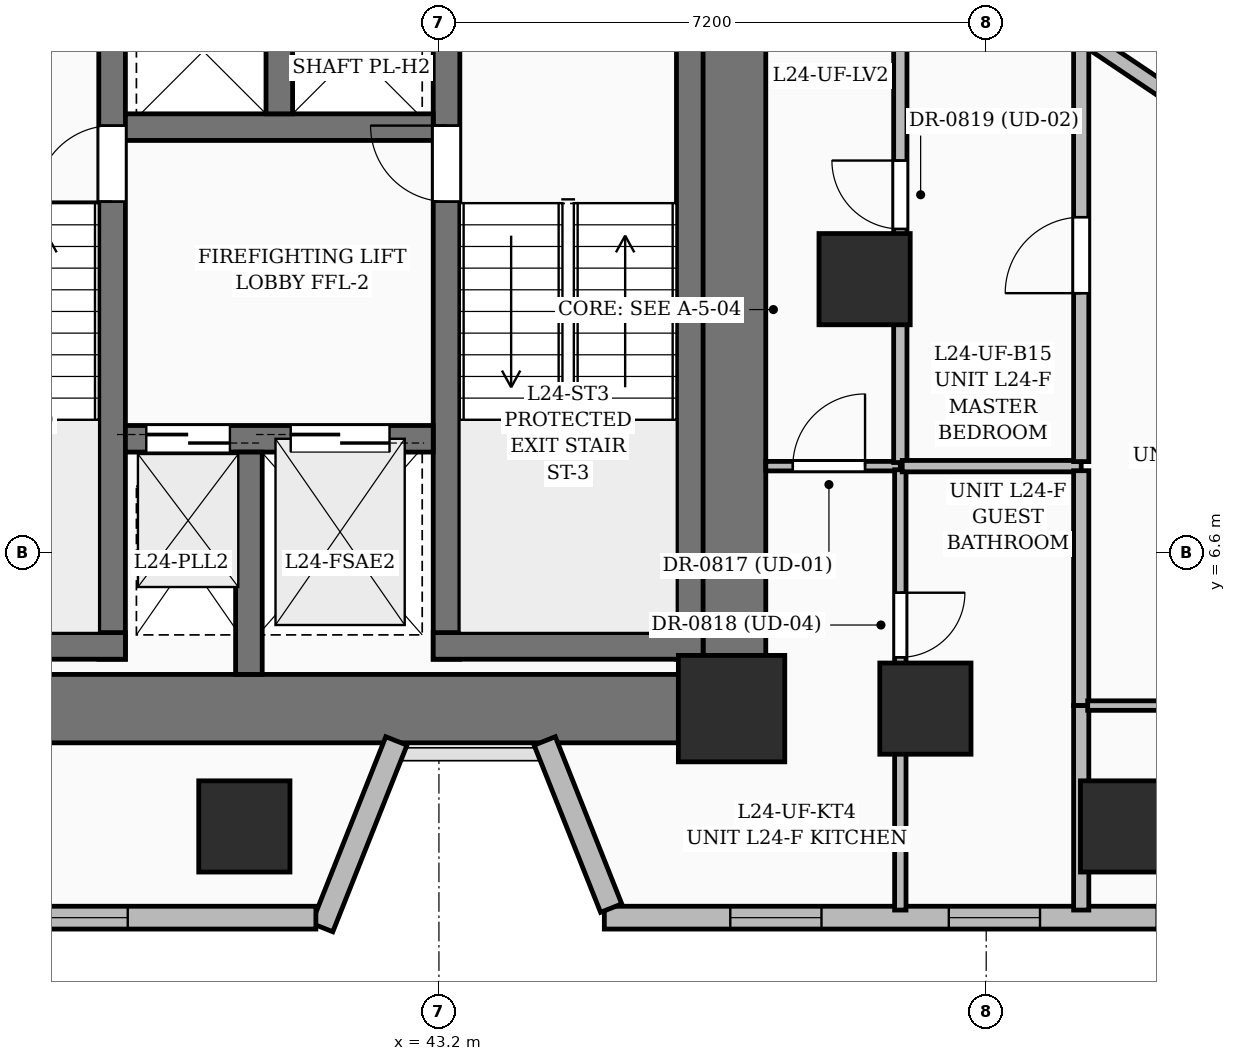
"""IFC4 building model, lengths in metres.
Left out: names, types, materials, properties, quantities, classifications, styles, units other than length and angle.
Written with IfcOpenShell. Run it as: python <this file> out.ifc"""

import sys

from ifc_helpers import new_model, si_unit, direction, frame, frame_2d, origin, origin_2d, place, context, subcontext, project, spatial, rectangle, extrude, element, fill, save


model = new_model("IFC4")
c1 = context("Model", 3, precision=1e-05, world=origin(), true_north=direction((0.0, 1.0)))
c2 = subcontext(c1, "Body", "Model", "MODEL_VIEW")
j1 = project(units=[si_unit("LENGTHUNIT", "METRE"), si_unit("PLANEANGLEUNIT", "RADIAN")], contexts=[c1])
p1 = place(None, origin())
s1 = spatial("IfcSite", under=j1, at=p1, CompositionType="ELEMENT")
p2 = place(p1, origin())
s2 = spatial("IfcBuilding", under=s1, at=p2, CompositionType="ELEMENT")
p3 = place(p2, frame((0.0, 0.0, 96.6)))
s3 = spatial("IfcBuildingStorey", under=s2, at=p3, CompositionType="ELEMENT", Elevation=96.6)
p4 = place(p3, frame((47.05, 4.55, 0.0), z_axis=(0.0, 0.0, 1.0), x_axis=(1.0, 0.0, 0.0)))
e1 = element("IfcColumn", 1, at=p4, inside=s3, PredefinedType="COLUMN", context=c2, shape_type="SweptSolid", body=[
    extrude(rectangle(XDim=1.4, YDim=1.4, at=origin_2d()), origin(), (0.0, 0.0, 1.0), 3.6),
])
for number, where, z_axis, x_axis in (
    (2, (49.6, 4.55, 0.0), (0.0, 0.0, 1.0), (1.0, 0.0, 0.0)),
    (3, (48.8, 10.2, 0.0), (0.0, 0.0, 1.0), (1.0, 0.0, 0.0)),
):
    element("IfcColumn", number, at=place(p3, frame(where, z_axis=z_axis, x_axis=x_axis)), inside=s3, PredefinedType="COLUMN", context=c2, shape_type="SweptSolid", body=[
        extrude(rectangle(XDim=1.2, YDim=1.2, at=origin_2d()), origin(), (0.0, 0.0, 1.0), 3.6),
    ])
p5 = place(p3, frame((35.85, 4.55, 0.0), z_axis=(0.0, 0.0, 1.0), x_axis=(1.0, 0.0, 0.0)))
e4 = element("IfcWall", 4, at=p5, inside=s3, PredefinedType="SHEAR", context=c2, shape_type="SweptSolid", body=[
    extrude(rectangle(XDim=10.5, YDim=0.9, at=frame_2d((5.25, 0.0))), origin(), (0.0, 0.0, 1.0), 3.6),
])
p6 = place(p3, frame((47.05, 5.25, 0.0), z_axis=(0.0, 0.0, 1.0), x_axis=(0.0, 1.0, 0.0)))
e5 = element("IfcWall", 5, at=p6, inside=s3, PredefinedType="SHEAR", context=c2, shape_type="SweptSolid", body=[
    extrude(rectangle(XDim=8.8, YDim=0.9, at=frame_2d((4.4, 0.0))), origin(), (0.0, 0.0, 1.0), 3.6),
])
p7 = place(p3, frame((38.9, 5.2, 0.0), z_axis=(0.0, 0.0, 1.0), x_axis=(0.0, 1.0, 0.0)))
e6 = element("IfcWall", 6, at=p7, inside=s3, PredefinedType="SOLIDWALL", context=c2, shape_type="SweptSolid", body=[
    extrude(rectangle(XDim=9.1, YDim=0.35, at=frame_2d((4.55, 0.0))), origin(), (0.0, 0.0, 1.0), 3.6),
])
p8 = place(p7, frame((6.02, 0.0, 0.0)))
e7 = element("IfcOpeningElement", 7, at=p8, cuts=e6, PredefinedType="OPENING", context=c2, shape_type="SweptSolid", body=[
    extrude(rectangle(XDim=1.0, YDim=2.15, at=frame_2d((0.5, 1.075))), frame((0.0, 0.185, 0.0), z_axis=(0.0, -1.0, 0.0), x_axis=(1.0, 0.0, 0.0)), (0.0, 0.0, 1.0), 0.37),
])
p9 = place(p3, frame((35.525, 5.375, 0.0), z_axis=(0.0, 0.0, 1.0), x_axis=(1.0, 0.0, 0.0)))
e8 = element("IfcWall", 8, at=p9, inside=s3, PredefinedType="SOLIDWALL", context=c2, shape_type="SweptSolid", body=[
    extrude(rectangle(XDim=3.55, YDim=0.35, at=frame_2d((1.775, 0.0))), origin(), (0.0, 0.0, 1.0), 3.6),
])
p10 = place(p3, frame((43.3, 5.2, 0.0), z_axis=(0.0, 0.0, 1.0), x_axis=(0.0, 1.0, 0.0)))
e9 = element("IfcWall", 9, at=p10, inside=s3, PredefinedType="SOLIDWALL", context=c2, shape_type="SweptSolid", body=[
    extrude(rectangle(XDim=9.1, YDim=0.35, at=frame_2d((4.55, 0.0))), origin(), (0.0, 0.0, 1.0), 3.6),
])
p11 = place(p10, frame((6.02, 0.0, 0.0)))
e10 = element("IfcOpeningElement", 10, at=p11, cuts=e9, PredefinedType="OPENING", context=c2, shape_type="SweptSolid", body=[
    extrude(rectangle(XDim=1.0, YDim=2.15, at=frame_2d((0.5, 1.075))), frame((0.0, 0.185, 0.0), z_axis=(0.0, -1.0, 0.0), x_axis=(1.0, 0.0, 0.0)), (0.0, 0.0, 1.0), 0.37),
])
p12 = place(p3, frame((46.5, 5.2, 0.0), z_axis=(0.0, 0.0, 1.0), x_axis=(0.0, 1.0, 0.0)))
e11 = element("IfcWall", 11, at=p12, inside=s3, PredefinedType="SOLIDWALL", context=c2, shape_type="SweptSolid", body=[
    extrude(rectangle(XDim=9.1, YDim=0.35, at=frame_2d((4.55, 0.0))), origin(), (0.0, 0.0, 1.0), 3.6),
])
p13 = place(p3, frame((43.125, 5.375, 0.0), z_axis=(0.0, 0.0, 1.0), x_axis=(1.0, 0.0, 0.0)))
e12 = element("IfcWall", 12, at=p13, inside=s3, PredefinedType="SOLIDWALL", context=c2, shape_type="SweptSolid", body=[
    extrude(rectangle(XDim=3.55, YDim=0.35, at=frame_2d((1.775, 0.0))), origin(), (0.0, 0.0, 1.0), 3.6),
])
p14 = place(p3, frame((39.075, 8.1, 0.0), z_axis=(0.0, 0.0, 1.0), x_axis=(1.0, 0.0, 0.0)))
e13 = element("IfcWall", 13, at=p14, inside=s3, PredefinedType="SOLIDWALL", context=c2, shape_type="SweptSolid", body=[
    extrude(rectangle(XDim=4.05, YDim=0.35, at=frame_2d((2.025, 0.0))), origin(), (0.0, 0.0, 1.0), 3.6),
])
p15 = place(p14, frame((2.175, 0.0, 0.0)))
e14 = element("IfcOpeningElement", 14, at=p15, cuts=e13, PredefinedType="OPENING", context=c2, shape_type="SweptSolid", body=[
    extrude(rectangle(XDim=1.3, YDim=2.25, at=frame_2d((0.65, 1.125))), frame((0.0, 0.185, 0.0), z_axis=(0.0, -1.0, 0.0), x_axis=(1.0, 0.0, 0.0)), (0.0, 0.0, 1.0), 0.37),
])
p16 = place(p14, frame((0.275, 0.0, 0.0)))
e15 = element("IfcOpeningElement", 15, at=p16, cuts=e13, PredefinedType="OPENING", context=c2, shape_type="SweptSolid", body=[
    extrude(rectangle(XDim=1.1, YDim=2.2, at=frame_2d((0.55, 1.1))), frame((0.0, 0.185, 0.0), z_axis=(0.0, -1.0, 0.0), x_axis=(1.0, 0.0, 0.0)), (0.0, 0.0, 1.0), 0.37),
])
p17 = place(p3, frame((40.7, 5.0, 0.0), z_axis=(0.0, 0.0, 1.0), x_axis=(0.0, 1.0, 0.0)))
e16 = element("IfcWall", 16, at=p17, inside=s3, PredefinedType="SOLIDWALL", context=c2, shape_type="SweptSolid", body=[
    extrude(rectangle(XDim=2.925, YDim=0.35, at=frame_2d((1.462, 0.0))), origin(), (0.0, 0.0, 1.0), 3.6),
])
p18 = place(p3, frame((39.075, 12.2, 0.0), z_axis=(0.0, 0.0, 1.0), x_axis=(1.0, 0.0, 0.0)))
e17 = element("IfcWall", 17, at=p18, inside=s3, PredefinedType="SOLIDWALL", context=c2, shape_type="SweptSolid", body=[
    extrude(rectangle(XDim=4.05, YDim=0.35, at=frame_2d((2.025, 0.0))), origin(), (0.0, 0.0, 1.0), 3.6),
])
p19 = place(p3, frame((41.1, 12.375, 0.0), z_axis=(0.0, 0.0, 1.0), x_axis=(0.0, 1.0, 0.0)))
e18 = element("IfcWall", 18, at=p19, inside=s3, PredefinedType="SOLIDWALL", context=c2, shape_type="SweptSolid", body=[
    extrude(rectangle(XDim=1.925, YDim=0.35, at=frame_2d((0.962, 0.0))), origin(), (0.0, 0.0, 1.0), 3.6),
])
for number, where, z_axis, x_axis in (
    (19, (40.64, 3.0, 0.0), (0.0, 0.0, 1.0), (1.0, 0.0, 0.0)),
    (20, (52.24, 3.0, 0.0), (0.0, 0.0, 1.0), (1.0, 0.0, 0.0)),
):
    element("IfcColumn", number, at=place(p3, frame(where, z_axis=z_axis, x_axis=x_axis)), inside=s3, PredefinedType="COLUMN", context=c2, shape_type="SweptSolid", body=[
        extrude(rectangle(XDim=1.2, YDim=1.2, at=origin_2d()), origin(), (0.0, 0.0, 1.0), 3.6),
    ])
p20 = place(p3, frame((52.658, 1.8, 0.0), z_axis=(0.0, 0.0, 1.0), x_axis=(-1.0, 0.0, 0.0)))
e21 = element("IfcWall", 21, at=p20, inside=s3, PredefinedType="SOLIDWALL", context=c2, shape_type="SweptSolid", body=[
    extrude(rectangle(XDim=7.282, YDim=0.3, at=frame_2d((3.641, 0.0))), origin(), (0.0, 0.0, 1.0), 3.3),
])
p21 = place(p20, frame((1.55, 0.0, 0.8)))
e22 = element("IfcOpeningElement", 22, at=p21, cuts=e21, PredefinedType="OPENING", context=c2, shape_type="SweptSolid", body=[
    extrude(rectangle(XDim=1.2, YDim=1.8, at=frame_2d((0.6, 0.9))), frame((0.0, 0.16, 0.0), z_axis=(0.0, -1.0, 0.0), x_axis=(1.0, 0.0, 0.0)), (0.0, 0.0, 1.0), 0.32),
])
p22 = place(p20, frame((4.425, 0.0, 0.8)))
e23 = element("IfcOpeningElement", 23, at=p22, cuts=e21, PredefinedType="OPENING", context=c2, shape_type="SweptSolid", body=[
    extrude(rectangle(XDim=1.2, YDim=1.8, at=frame_2d((0.6, 0.9))), frame((0.0, 0.16, 0.0), z_axis=(0.0, -1.0, 0.0), x_axis=(1.0, 0.0, 0.0)), (0.0, 0.0, 1.0), 0.32),
])
p23 = place(p3, frame((45.466, 1.925, 0.0), z_axis=(0.0, 0.0, 1.0), x_axis=(-0.36946923074, 0.92924296475, 0.0)))
e24 = element("IfcWall", 24, at=p23, inside=s3, PredefinedType="SOLIDWALL", context=c2, shape_type="SweptSolid", body=[
    extrude(rectangle(XDim=2.367, YDim=0.3, at=frame_2d((1.184, 0.0))), origin(), (0.0, 0.0, 1.0), 2.325),
])
p24 = place(p3, frame((42.64, 4.125, 0.0), z_axis=(0.0, 0.0, 1.0), x_axis=(-0.369477840539, -0.929239541426, 0.0)))
e25 = element("IfcWall", 25, at=p24, inside=s3, PredefinedType="SOLIDWALL", context=c2, shape_type="SweptSolid", body=[
    extrude(rectangle(XDim=2.642, YDim=0.3, at=frame_2d((1.321, 0.0))), origin(), (0.0, 0.0, 1.0), 2.325),
])
p25 = place(p3, frame((41.581, 1.8, 0.0), z_axis=(0.0, 0.0, 1.0), x_axis=(-1.0, 0.0, 0.0)))
e26 = element("IfcWall", 26, at=p25, inside=s3, PredefinedType="SOLIDWALL", context=c2, shape_type="SweptSolid", body=[
    extrude(rectangle(XDim=7.174, YDim=0.3, at=frame_2d((3.587, 0.0))), origin(), (0.0, 0.0, 1.0), 3.3),
])
p26 = place(p25, frame((2.475, 0.0, 0.6)))
e27 = element("IfcOpeningElement", 27, at=p26, cuts=e26, PredefinedType="OPENING", context=c2, shape_type="SweptSolid", body=[
    extrude(rectangle(XDim=1.8, YDim=2.1, at=frame_2d((0.9, 1.05))), frame((0.0, 0.16, 0.0), z_axis=(0.0, -1.0, 0.0), x_axis=(1.0, 0.0, 0.0)), (0.0, 0.0, 1.0), 0.32),
])
p27 = place(p3, frame((47.5, 7.74, 0.0), z_axis=(0.0, 0.0, 1.0), x_axis=(1.0, 0.0, 0.0)))
e28 = element("IfcWall", 28, at=p27, inside=s3, PredefinedType="PARTITIONING", context=c2, shape_type="SweptSolid", body=[
    extrude(rectangle(XDim=1.77, YDim=0.125, at=frame_2d((0.885, 0.0))), origin(), (0.0, 0.0, 1.0), 2.259),
])
p28 = place(p27, frame((0.356, 0.0, 0.0)))
e29 = element("IfcOpeningElement", 29, at=p28, cuts=e28, PredefinedType="OPENING", context=c2, shape_type="SweptSolid", body=[
    extrude(rectangle(XDim=0.95, YDim=2.2, at=frame_2d((0.475, 1.1))), frame((0.0, 0.072, 0.0), z_axis=(0.0, -1.0, 0.0), x_axis=(1.0, 0.0, 0.0)), (0.0, 0.0, 1.0), 0.145),
])
p29 = place(p3, frame((49.27, 7.788, 0.0), z_axis=(0.0, 0.0, 1.0), x_axis=(0.0, 1.0, 0.0)))
e30 = element("IfcWall", 30, at=p29, inside=s3, PredefinedType="PARTITIONING", context=c2, shape_type="SweptSolid", body=[
    extrude(rectangle(XDim=7.102, YDim=0.175, at=frame_2d((3.551, 0.0))), origin(), (0.0, 0.0, 1.0), 2.81),
])
p30 = place(p29, frame((3.073, 0.0, 0.0)))
e31 = element("IfcOpeningElement", 31, at=p30, cuts=e30, PredefinedType="OPENING", context=c2, shape_type="SweptSolid", body=[
    extrude(rectangle(XDim=0.9, YDim=2.15, at=frame_2d((0.45, 1.075))), frame((0.0, 0.097, 0.0), z_axis=(0.0, -1.0, 0.0), x_axis=(1.0, 0.0, 0.0)), (0.0, 0.0, 1.0), 0.195),
])
p31 = place(p3, frame((49.27, 7.692, 0.0), z_axis=(0.0, 0.0, 1.0), x_axis=(0.0, -1.0, 0.0)))
e32 = element("IfcWall", 32, at=p31, inside=s3, PredefinedType="PARTITIONING", context=c2, shape_type="SweptSolid", body=[
    extrude(rectangle(XDim=5.792, YDim=0.15, at=frame_2d((2.896, 0.0))), origin(), (0.0, 0.0, 1.0), 2.32),
])
p32 = place(p31, frame((1.618, 0.0, 0.0)))
e33 = element("IfcOpeningElement", 33, at=p32, cuts=e32, PredefinedType="OPENING", context=c2, shape_type="SweptSolid", body=[
    extrude(rectangle(XDim=0.85, YDim=2.1, at=frame_2d((0.425, 1.05))), frame((0.0, 0.085, 0.0), z_axis=(0.0, -1.0, 0.0), x_axis=(1.0, 0.0, 0.0)), (0.0, 0.0, 1.0), 0.17),
])
p33 = place(p3, frame((51.65, 7.74, 0.0), z_axis=(0.0, 0.0, 1.0), x_axis=(-1.0, 0.0, 0.0)))
e34 = element("IfcWall", 34, at=p33, inside=s3, PredefinedType="PARTITIONING", context=c2, shape_type="SweptSolid", body=[
    extrude(rectangle(XDim=2.355, YDim=0.15, at=frame_2d((1.177, 0.0))), origin(), (0.0, 0.0, 1.0), 3.3),
])
p34 = place(p3, frame((51.65, 4.59, 0.0), z_axis=(0.0, 0.0, 1.0), x_axis=(0.0, 1.0, 0.0)))
e35 = element("IfcWall", 35, at=p34, inside=s3, PredefinedType="PARTITIONING", context=c2, shape_type="SweptSolid", body=[
    extrude(rectangle(XDim=3.09, YDim=0.2, at=frame_2d((1.545, 0.0))), origin(), (0.0, 0.0, 1.0), 2.81),
])
p35 = place(p3, frame((51.65, 1.9, 0.0), z_axis=(0.0, 0.0, 1.0), x_axis=(0.0, 1.0, 0.0)))
e36 = element("IfcWall", 36, at=p35, inside=s3, PredefinedType="PARTITIONING", context=c2, shape_type="SweptSolid", body=[
    extrude(rectangle(XDim=2.69, YDim=0.2, at=frame_2d((1.345, 0.0))), origin(), (0.0, 0.0, 1.0), 2.295),
])
p36 = place(p3, frame((51.65, 7.8, 0.0), z_axis=(0.0, 0.0, 1.0), x_axis=(0.0, 1.0, 0.0)))
e37 = element("IfcWall", 37, at=p36, inside=s3, PredefinedType="PARTITIONING", context=c2, shape_type="SweptSolid", body=[
    extrude(rectangle(XDim=5.485, YDim=0.2, at=frame_2d((2.742, 0.0))), origin(), (0.0, 0.0, 1.0), 2.295),
])
p37 = place(p36, frame((2.216, 0.0, 0.0)))
e38 = element("IfcOpeningElement", 38, at=p37, cuts=e37, PredefinedType="OPENING", context=c2, shape_type="SweptSolid", body=[
    extrude(rectangle(XDim=1.0, YDim=2.2, at=frame_2d((0.5, 1.1))), frame((0.0, 0.11, 0.0), z_axis=(0.0, -1.0, 0.0), x_axis=(1.0, 0.0, 0.0)), (0.0, 0.0, 1.0), 0.22),
])
p38 = place(p3, frame((51.735, 4.59, 0.0), z_axis=(0.0, 0.0, 1.0), x_axis=(1.0, 0.0, 0.0)))
e39 = element("IfcWall", 39, at=p38, inside=s3, PredefinedType="PARTITIONING", context=c2, shape_type="SweptSolid", body=[
    extrude(rectangle(XDim=4.645, YDim=0.125, at=frame_2d((2.322, 0.0))), origin(), (0.0, 0.0, 1.0), 2.32),
])
p39 = place(p38, frame((1.805, 0.0, 0.0)))
e40 = element("IfcOpeningElement", 40, at=p39, cuts=e39, PredefinedType="OPENING", context=c2, shape_type="SweptSolid", body=[
    extrude(rectangle(XDim=0.95, YDim=2.2, at=frame_2d((0.475, 1.1))), frame((0.0, 0.072, 0.0), z_axis=(0.0, -1.0, 0.0), x_axis=(1.0, 0.0, 0.0)), (0.0, 0.0, 1.0), 0.145),
])
p40 = place(p3, frame((53.26, 12.33, 0.0), z_axis=(0.0, 0.0, 1.0), x_axis=(-0.830486641952, 0.557038542239, 0.0)))
e41 = element("IfcWall", 41, at=p40, inside=s3, PredefinedType="PARTITIONING", context=c2, shape_type="SweptSolid", body=[
    extrude(rectangle(XDim=1.854, YDim=0.2, at=frame_2d((0.927, 0.0))), origin(), (0.0, 0.0, 1.0), 2.81),
])
p41 = place(p21, origin())
e42 = element("IfcWindow", 42, at=p41, inside=s3, PartitioningType="SINGLE_PANEL", PredefinedType="WINDOW", context=c2, shape_type="SweptSolid", body=[
    extrude(rectangle(XDim=1.2, YDim=1.8, at=frame_2d((0.6, 0.9))), frame((0.0, 0.03, 0.0), z_axis=(0.0, -1.0, 0.0), x_axis=(1.0, 0.0, 0.0)), (0.0, 0.0, 1.0), 0.06),
])
fill(e22, e42)
p42 = place(p22, origin())
e43 = element("IfcWindow", 43, at=p42, inside=s3, PartitioningType="SINGLE_PANEL", PredefinedType="WINDOW", context=c2, shape_type="SweptSolid", body=[
    extrude(rectangle(XDim=1.2, YDim=1.8, at=frame_2d((0.6, 0.9))), frame((0.0, 0.03, 0.0), z_axis=(0.0, -1.0, 0.0), x_axis=(1.0, 0.0, 0.0)), (0.0, 0.0, 1.0), 0.06),
])
fill(e23, e43)
p43 = place(p26, origin())
e44 = element("IfcWindow", 44, at=p43, inside=s3, PartitioningType="SINGLE_PANEL", PredefinedType="WINDOW", context=c2, shape_type="SweptSolid", body=[
    extrude(rectangle(XDim=1.8, YDim=2.1, at=frame_2d((0.9, 1.05))), frame((0.0, 0.03, 0.0), z_axis=(0.0, -1.0, 0.0), x_axis=(1.0, 0.0, 0.0)), (0.0, 0.0, 1.0), 0.06),
])
fill(e27, e44)
p44 = place(p8, origin())
e45 = element("IfcDoor", 45, at=p44, inside=s3, OperationType="SINGLE_SWING_LEFT", PredefinedType="DOOR", context=c2, shape_type="SweptSolid", body=[
    extrude(rectangle(XDim=1.0, YDim=2.15, at=frame_2d((0.5, 1.075))), frame((0.0, 0.025, 0.0), z_axis=(0.0, -1.0, 0.0), x_axis=(1.0, 0.0, 0.0)), (0.0, 0.0, 1.0), 0.05),
])
fill(e7, e45)
p45 = place(p11, origin())
e46 = element("IfcDoor", 46, at=p45, inside=s3, OperationType="SINGLE_SWING_RIGHT", PredefinedType="DOOR", context=c2, shape_type="SweptSolid", body=[
    extrude(rectangle(XDim=1.0, YDim=2.15, at=frame_2d((0.5, 1.075))), frame((0.0, 0.025, 0.0), z_axis=(0.0, -1.0, 0.0), x_axis=(1.0, 0.0, 0.0)), (0.0, 0.0, 1.0), 0.05),
])
fill(e10, e46)
p46 = place(p15, origin())
e47 = element("IfcDoor", 47, at=p46, inside=s3, OperationType="DOUBLE_DOOR_SLIDING", PredefinedType="DOOR", context=c2, shape_type="SweptSolid", body=[
    extrude(rectangle(XDim=1.3, YDim=2.25, at=frame_2d((0.65, 1.125))), frame((0.0, 0.025, 0.0), z_axis=(0.0, -1.0, 0.0), x_axis=(1.0, 0.0, 0.0)), (0.0, 0.0, 1.0), 0.05),
])
fill(e14, e47)
p47 = place(p16, origin())
e48 = element("IfcDoor", 48, at=p47, inside=s3, OperationType="DOUBLE_DOOR_SLIDING", PredefinedType="DOOR", context=c2, shape_type="SweptSolid", body=[
    extrude(rectangle(XDim=1.1, YDim=2.2, at=frame_2d((0.55, 1.1))), frame((0.0, 0.025, 0.0), z_axis=(0.0, -1.0, 0.0), x_axis=(1.0, 0.0, 0.0)), (0.0, 0.0, 1.0), 0.05),
])
fill(e15, e48)
p48 = place(p28, origin())
e49 = element("IfcDoor", 49, at=p48, inside=s3, OperationType="SINGLE_SWING_RIGHT", PredefinedType="DOOR", context=c2, shape_type="SweptSolid", body=[
    extrude(rectangle(XDim=0.95, YDim=2.2, at=frame_2d((0.475, 1.1))), frame((0.0, 0.025, 0.0), z_axis=(0.0, -1.0, 0.0), x_axis=(1.0, 0.0, 0.0)), (0.0, 0.0, 1.0), 0.05),
])
fill(e29, e49)
p49 = place(p32, origin())
e50 = element("IfcDoor", 50, at=p49, inside=s3, OperationType="SINGLE_SWING_LEFT", PredefinedType="DOOR", context=c2, shape_type="SweptSolid", body=[
    extrude(rectangle(XDim=0.85, YDim=2.1, at=frame_2d((0.425, 1.05))), frame((0.0, 0.025, 0.0), z_axis=(0.0, -1.0, 0.0), x_axis=(1.0, 0.0, 0.0)), (0.0, 0.0, 1.0), 0.05),
])
fill(e33, e50)
p50 = place(p30, origin())
e51 = element("IfcDoor", 51, at=p50, inside=s3, OperationType="SINGLE_SWING_RIGHT", PredefinedType="DOOR", context=c2, shape_type="SweptSolid", body=[
    extrude(rectangle(XDim=0.9, YDim=2.15, at=frame_2d((0.45, 1.075))), frame((0.0, 0.025, 0.0), z_axis=(0.0, -1.0, 0.0), x_axis=(1.0, 0.0, 0.0)), (0.0, 0.0, 1.0), 0.05),
])
fill(e31, e51)
p51 = place(p37, origin())
e52 = element("IfcDoor", 52, at=p51, inside=s3, OperationType="SINGLE_SWING_LEFT", PredefinedType="DOOR", context=c2, shape_type="SweptSolid", body=[
    extrude(rectangle(XDim=1.0, YDim=2.2, at=frame_2d((0.5, 1.1))), frame((0.0, 0.025, 0.0), z_axis=(0.0, -1.0, 0.0), x_axis=(1.0, 0.0, 0.0)), (0.0, 0.0, 1.0), 0.05),
])
fill(e38, e52)
save(model, sys.argv[1])
